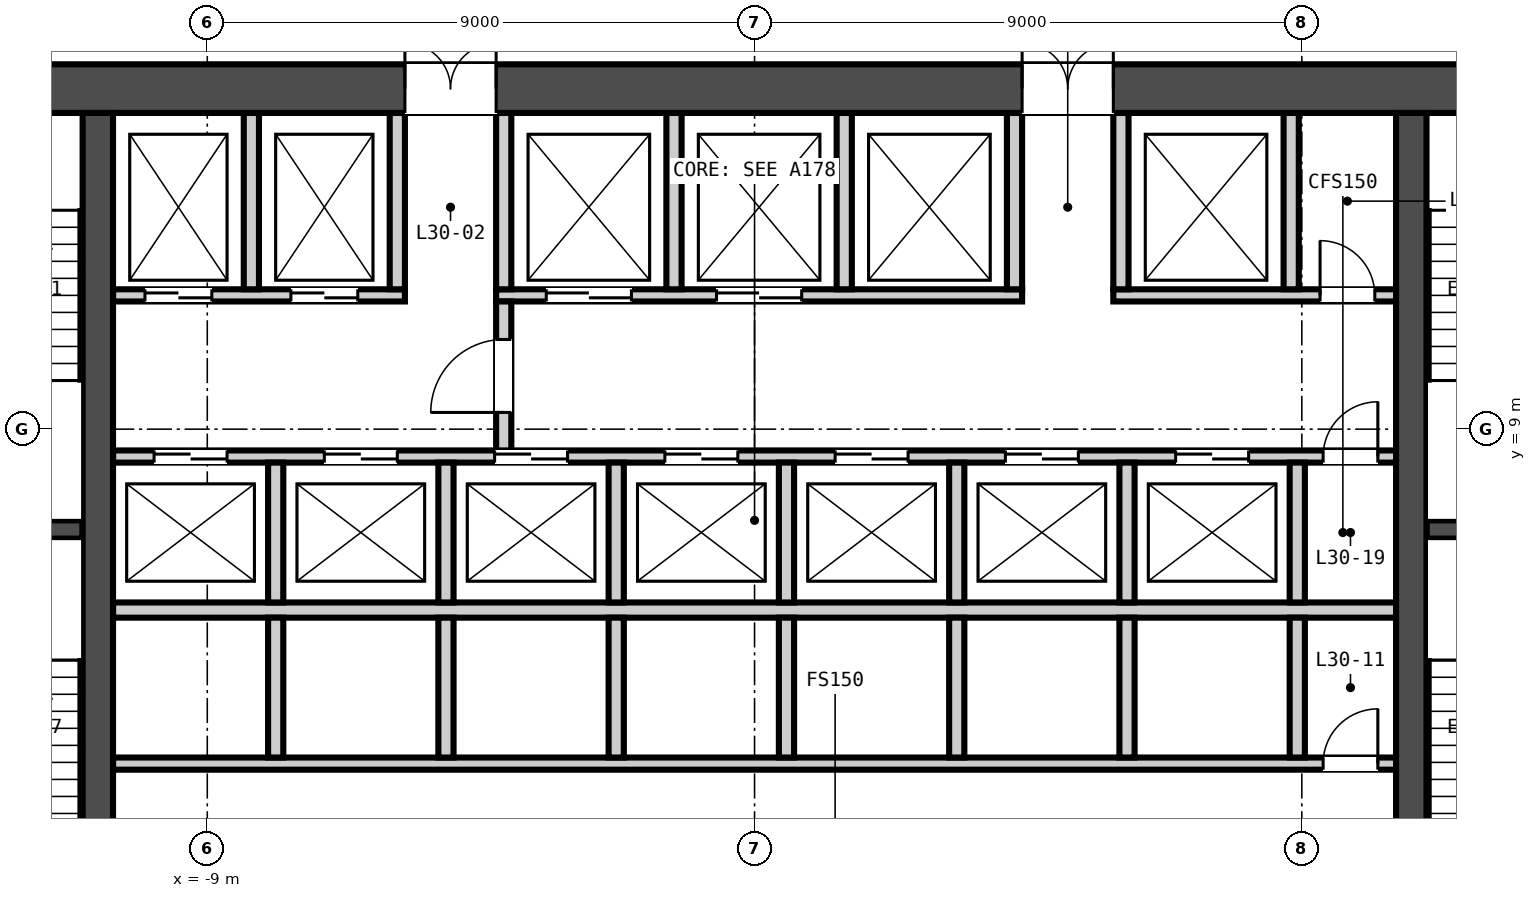
"""IFC4 building model, lengths in metres.
Left out: names, types, materials, properties, quantities, classifications, styles, units other than length and angle.
Written with IfcOpenShell. Run it as: python <this file> out.ifc"""

import sys

from ifc_helpers import new_model, si_unit, direction, frame, frame_2d, origin, place, context, subcontext, project, spatial, rectangle, extrude, element, fill, save


model = new_model("IFC4")
c1 = context("Model", 3, precision=1e-05, world=origin(), true_north=direction((0.0, 1.0)))
c2 = subcontext(c1, "Body", "Model", "MODEL_VIEW")
j1 = project(units=[si_unit("LENGTHUNIT", "METRE"), si_unit("PLANEANGLEUNIT", "RADIAN")], contexts=[c1])
p1 = place(None, origin())
s1 = spatial("IfcSite", under=j1, at=p1, CompositionType="ELEMENT")
p2 = place(p1, origin())
s2 = spatial("IfcBuilding", under=s1, at=p2, CompositionType="ELEMENT")
p3 = place(p2, frame((0.0, 0.0, 126.15)))
s3 = spatial("IfcBuildingStorey", under=s2, at=p3, CompositionType="ELEMENT", Elevation=126.15)
p4 = place(p3, frame((-15.0, 14.6, -0.15), z_axis=(0.0, 0.0, 1.0), x_axis=(1.0, 0.0, 0.0)))
e1 = element("IfcWall", 1, at=p4, inside=s3, PredefinedType="SOLIDWALL", context=c2, shape_type="SweptSolid", body=[
    extrude(rectangle(XDim=30.0, YDim=0.8, at=frame_2d((15.0, 0.0))), origin(), (0.0, 0.0, 1.0), 3.65),
])
p5 = place(p4, frame((9.25, 0.0, 0.15)))
e2 = element("IfcOpeningElement", 2, at=p5, cuts=e1, PredefinedType="OPENING", context=c2, shape_type="SweptSolid", body=[
    extrude(rectangle(XDim=1.5, YDim=2.1, at=frame_2d((0.75, 1.05))), frame((0.0, 0.41, 0.0), z_axis=(0.0, -1.0, 0.0), x_axis=(1.0, 0.0, 0.0)), (0.0, 0.0, 1.0), 0.82),
])
p6 = place(p4, frame((19.4, 0.0, 0.15)))
e3 = element("IfcOpeningElement", 3, at=p6, cuts=e1, PredefinedType="OPENING", context=c2, shape_type="SweptSolid", body=[
    extrude(rectangle(XDim=1.5, YDim=2.1, at=frame_2d((0.75, 1.05))), frame((0.0, 0.41, 0.0), z_axis=(0.0, -1.0, 0.0), x_axis=(1.0, 0.0, 0.0)), (0.0, 0.0, 1.0), 0.82),
])
p7 = place(p4, frame((1.5, 0.0, 0.15)))
e4 = element("IfcOpeningElement", 4, at=p7, cuts=e1, PredefinedType="OPENING", context=c2, shape_type="SweptSolid", body=[
    extrude(rectangle(XDim=1.2, YDim=2.1, at=frame_2d((0.6, 1.05))), frame((0.0, 0.41, 0.0), z_axis=(0.0, -1.0, 0.0), x_axis=(1.0, 0.0, 0.0)), (0.0, 0.0, 1.0), 0.82),
])
p8 = place(p4, frame((27.3, 0.0, 0.15)))
e5 = element("IfcOpeningElement", 5, at=p8, cuts=e1, PredefinedType="OPENING", context=c2, shape_type="SweptSolid", body=[
    extrude(rectangle(XDim=1.2, YDim=2.1, at=frame_2d((0.6, 1.05))), frame((0.0, 0.41, 0.0), z_axis=(0.0, -1.0, 0.0), x_axis=(1.0, 0.0, 0.0)), (0.0, 0.0, 1.0), 0.82),
])
for number, where, z_axis, x_axis in (
    (6, (-10.8, 0.8, -0.15), (0.0, 0.0, 1.0), (0.0, 1.0, 0.0)),
    (7, (10.8, 0.8, -0.15), (0.0, 0.0, 1.0), (0.0, 1.0, 0.0)),
):
    element("IfcWall", number, at=place(p3, frame(where, z_axis=z_axis, x_axis=x_axis)), inside=s3, PredefinedType="SOLIDWALL", context=c2, shape_type="SweptSolid", body=[
        extrude(rectangle(XDim=13.4, YDim=0.5, at=frame_2d((6.7, 0.0))), origin(), (0.0, 0.0, 1.0), 3.65),
    ])
p9 = place(p3, frame((-10.55, 3.5, 0.0), z_axis=(0.0, 0.0, 1.0), x_axis=(1.0, 0.0, 0.0)))
e8 = element("IfcWall", 8, at=p9, inside=s3, PredefinedType="PARTITIONING", context=c2, shape_type="SweptSolid", body=[
    extrude(rectangle(XDim=21.1, YDim=0.2, at=frame_2d((10.55, 0.0))), origin(), (0.0, 0.0, 1.0), 3.5),
])
p10 = place(p9, frame((19.9, 0.0, 0.0)))
e9 = element("IfcOpeningElement", 9, at=p10, cuts=e8, PredefinedType="OPENING", context=c2, shape_type="SweptSolid", body=[
    extrude(rectangle(XDim=0.9, YDim=2.1, at=frame_2d((0.45, 1.05))), frame((0.0, 0.11, 0.0), z_axis=(0.0, -1.0, 0.0), x_axis=(1.0, 0.0, 0.0)), (0.0, 0.0, 1.0), 0.22),
])
p11 = place(p3, frame((-10.55, 6.025, 0.0), z_axis=(0.0, 0.0, 1.0), x_axis=(1.0, 0.0, 0.0)))
e10 = element("IfcWall", 10, at=p11, inside=s3, PredefinedType="PARTITIONING", context=c2, shape_type="SweptSolid", body=[
    extrude(rectangle(XDim=21.1, YDim=0.25, at=frame_2d((10.55, 0.0))), origin(), (0.0, 0.0, 1.0), 3.5),
])
p12 = place(p3, frame((-10.55, 8.55, 0.0), z_axis=(0.0, 0.0, 1.0), x_axis=(1.0, 0.0, 0.0)))
e11 = element("IfcWall", 11, at=p12, inside=s3, PredefinedType="PARTITIONING", context=c2, shape_type="SweptSolid", body=[
    extrude(rectangle(XDim=21.1, YDim=0.2, at=frame_2d((10.55, 0.0))), origin(), (0.0, 0.0, 1.0), 3.5),
])
p13 = place(p12, frame((0.675, 0.0, 0.0)))
e12 = element("IfcOpeningElement", 12, at=p13, cuts=e11, PredefinedType="OPENING", context=c2, shape_type="SweptSolid", body=[
    extrude(rectangle(XDim=1.2, YDim=2.1, at=frame_2d((0.6, 1.05))), frame((0.0, 0.11, 0.0), z_axis=(0.0, -1.0, 0.0), x_axis=(1.0, 0.0, 0.0)), (0.0, 0.0, 1.0), 0.22),
])
p14 = place(p12, frame((3.475, 0.0, 0.0)))
e13 = element("IfcOpeningElement", 13, at=p14, cuts=e11, PredefinedType="OPENING", context=c2, shape_type="SweptSolid", body=[
    extrude(rectangle(XDim=1.2, YDim=2.1, at=frame_2d((0.6, 1.05))), frame((0.0, 0.11, 0.0), z_axis=(0.0, -1.0, 0.0), x_axis=(1.0, 0.0, 0.0)), (0.0, 0.0, 1.0), 0.22),
])
p15 = place(p12, frame((6.275, 0.0, 0.0)))
e14 = element("IfcOpeningElement", 14, at=p15, cuts=e11, PredefinedType="OPENING", context=c2, shape_type="SweptSolid", body=[
    extrude(rectangle(XDim=1.2, YDim=2.1, at=frame_2d((0.6, 1.05))), frame((0.0, 0.11, 0.0), z_axis=(0.0, -1.0, 0.0), x_axis=(1.0, 0.0, 0.0)), (0.0, 0.0, 1.0), 0.22),
])
p16 = place(p12, frame((9.075, 0.0, 0.0)))
e15 = element("IfcOpeningElement", 15, at=p16, cuts=e11, PredefinedType="OPENING", context=c2, shape_type="SweptSolid", body=[
    extrude(rectangle(XDim=1.2, YDim=2.1, at=frame_2d((0.6, 1.05))), frame((0.0, 0.11, 0.0), z_axis=(0.0, -1.0, 0.0), x_axis=(1.0, 0.0, 0.0)), (0.0, 0.0, 1.0), 0.22),
])
p17 = place(p12, frame((11.875, 0.0, 0.0)))
e16 = element("IfcOpeningElement", 16, at=p17, cuts=e11, PredefinedType="OPENING", context=c2, shape_type="SweptSolid", body=[
    extrude(rectangle(XDim=1.2, YDim=2.1, at=frame_2d((0.6, 1.05))), frame((0.0, 0.11, 0.0), z_axis=(0.0, -1.0, 0.0), x_axis=(1.0, 0.0, 0.0)), (0.0, 0.0, 1.0), 0.22),
])
p18 = place(p12, frame((14.675, 0.0, 0.0)))
e17 = element("IfcOpeningElement", 17, at=p18, cuts=e11, PredefinedType="OPENING", context=c2, shape_type="SweptSolid", body=[
    extrude(rectangle(XDim=1.2, YDim=2.1, at=frame_2d((0.6, 1.05))), frame((0.0, 0.11, 0.0), z_axis=(0.0, -1.0, 0.0), x_axis=(1.0, 0.0, 0.0)), (0.0, 0.0, 1.0), 0.22),
])
p19 = place(p12, frame((17.475, 0.0, 0.0)))
e18 = element("IfcOpeningElement", 18, at=p19, cuts=e11, PredefinedType="OPENING", context=c2, shape_type="SweptSolid", body=[
    extrude(rectangle(XDim=1.2, YDim=2.1, at=frame_2d((0.6, 1.05))), frame((0.0, 0.11, 0.0), z_axis=(0.0, -1.0, 0.0), x_axis=(1.0, 0.0, 0.0)), (0.0, 0.0, 1.0), 0.22),
])
p20 = place(p12, frame((19.9, 0.0, 0.0)))
e19 = element("IfcOpeningElement", 19, at=p20, cuts=e11, PredefinedType="OPENING", context=c2, shape_type="SweptSolid", body=[
    extrude(rectangle(XDim=0.9, YDim=2.1, at=frame_2d((0.45, 1.05))), frame((0.0, 0.11, 0.0), z_axis=(0.0, -1.0, 0.0), x_axis=(1.0, 0.0, 0.0)), (0.0, 0.0, 1.0), 0.22),
])
p21 = place(p3, frame((-10.55, 11.2, 0.0), z_axis=(0.0, 0.0, 1.0), x_axis=(1.0, 0.0, 0.0)))
e20 = element("IfcWall", 20, at=p21, inside=s3, PredefinedType="PARTITIONING", context=c2, shape_type="SweptSolid", body=[
    extrude(rectangle(XDim=4.8, YDim=0.2, at=frame_2d((2.4, 0.0))), origin(), (0.0, 0.0, 1.0), 3.5),
])
p22 = place(p21, frame((0.525, 0.0, 0.0)))
e21 = element("IfcOpeningElement", 21, at=p22, cuts=e20, PredefinedType="OPENING", context=c2, shape_type="SweptSolid", body=[
    extrude(rectangle(XDim=1.1, YDim=2.1, at=frame_2d((0.55, 1.05))), frame((0.0, 0.11, 0.0), z_axis=(0.0, -1.0, 0.0), x_axis=(1.0, 0.0, 0.0)), (0.0, 0.0, 1.0), 0.22),
])
p23 = place(p21, frame((2.925, 0.0, 0.0)))
e22 = element("IfcOpeningElement", 22, at=p23, cuts=e20, PredefinedType="OPENING", context=c2, shape_type="SweptSolid", body=[
    extrude(rectangle(XDim=1.1, YDim=2.1, at=frame_2d((0.55, 1.05))), frame((0.0, 0.11, 0.0), z_axis=(0.0, -1.0, 0.0), x_axis=(1.0, 0.0, 0.0)), (0.0, 0.0, 1.0), 0.22),
])
p24 = place(p3, frame((-4.25, 11.2, 0.0), z_axis=(0.0, 0.0, 1.0), x_axis=(1.0, 0.0, 0.0)))
e23 = element("IfcWall", 23, at=p24, inside=s3, PredefinedType="PARTITIONING", context=c2, shape_type="SweptSolid", body=[
    extrude(rectangle(XDim=8.65, YDim=0.2, at=frame_2d((4.325, 0.0))), origin(), (0.0, 0.0, 1.0), 3.5),
])
p25 = place(p24, frame((0.825, 0.0, 0.0)))
e24 = element("IfcOpeningElement", 24, at=p25, cuts=e23, PredefinedType="OPENING", context=c2, shape_type="SweptSolid", body=[
    extrude(rectangle(XDim=1.4, YDim=2.1, at=frame_2d((0.7, 1.05))), frame((0.0, 0.11, 0.0), z_axis=(0.0, -1.0, 0.0), x_axis=(1.0, 0.0, 0.0)), (0.0, 0.0, 1.0), 0.22),
])
p26 = place(p24, frame((3.625, 0.0, 0.0)))
e25 = element("IfcOpeningElement", 25, at=p26, cuts=e23, PredefinedType="OPENING", context=c2, shape_type="SweptSolid", body=[
    extrude(rectangle(XDim=1.4, YDim=2.1, at=frame_2d((0.7, 1.05))), frame((0.0, 0.11, 0.0), z_axis=(0.0, -1.0, 0.0), x_axis=(1.0, 0.0, 0.0)), (0.0, 0.0, 1.0), 0.22),
])
p27 = place(p3, frame((5.9, 11.2, 0.0), z_axis=(0.0, 0.0, 1.0), x_axis=(1.0, 0.0, 0.0)))
e26 = element("IfcWall", 26, at=p27, inside=s3, PredefinedType="PARTITIONING", context=c2, shape_type="SweptSolid", body=[
    extrude(rectangle(XDim=4.65, YDim=0.2, at=frame_2d((2.325, 0.0))), origin(), (0.0, 0.0, 1.0), 3.5),
])
p28 = place(p27, frame((3.4, 0.0, 0.0)))
e27 = element("IfcOpeningElement", 27, at=p28, cuts=e26, PredefinedType="OPENING", context=c2, shape_type="SweptSolid", body=[
    extrude(rectangle(XDim=0.9, YDim=2.1, at=frame_2d((0.45, 1.05))), frame((0.0, 0.11, 0.0), z_axis=(0.0, -1.0, 0.0), x_axis=(1.0, 0.0, 0.0)), (0.0, 0.0, 1.0), 0.22),
])
p29 = place(p3, frame((-4.125, 8.65, 0.0), z_axis=(0.0, 0.0, 1.0), x_axis=(0.0, 1.0, 0.0)))
e28 = element("IfcWall", 28, at=p29, inside=s3, PredefinedType="PARTITIONING", context=c2, shape_type="SweptSolid", body=[
    extrude(rectangle(XDim=2.45, YDim=0.25, at=frame_2d((1.225, 0.0))), origin(), (0.0, 0.0, 1.0), 3.5),
])
p30 = place(p29, frame((0.625, 0.0, 0.0)))
e29 = element("IfcOpeningElement", 29, at=p30, cuts=e28, PredefinedType="OPENING", context=c2, shape_type="SweptSolid", body=[
    extrude(rectangle(XDim=1.2, YDim=2.1, at=frame_2d((0.6, 1.05))), frame((0.0, 0.135, 0.0), z_axis=(0.0, -1.0, 0.0), x_axis=(1.0, 0.0, 0.0)), (0.0, 0.0, 1.0), 0.27),
])
for number, where, z_axis, x_axis in (
    (30, (-7.875, 3.6, 0.0), (0.0, 0.0, 1.0), (0.0, 1.0, 0.0)),
    (31, (-5.075, 3.6, 0.0), (0.0, 0.0, 1.0), (0.0, 1.0, 0.0)),
    (32, (-2.275, 3.6, 0.0), (0.0, 0.0, 1.0), (0.0, 1.0, 0.0)),
    (33, (0.525, 3.6, 0.0), (0.0, 0.0, 1.0), (0.0, 1.0, 0.0)),
    (34, (3.325, 3.6, 0.0), (0.0, 0.0, 1.0), (0.0, 1.0, 0.0)),
    (35, (6.125, 3.6, 0.0), (0.0, 0.0, 1.0), (0.0, 1.0, 0.0)),
    (36, (8.925, 3.6, 0.0), (0.0, 0.0, 1.0), (0.0, 1.0, 0.0)),
):
    element("IfcWall", number, at=place(p3, frame(where, z_axis=z_axis, x_axis=x_axis)), inside=s3, PredefinedType="PARTITIONING", context=c2, shape_type="SweptSolid", body=[
        extrude(rectangle(XDim=2.3, YDim=0.25, at=frame_2d((1.15, 0.0))), origin(), (0.0, 0.0, 1.0), 3.5),
    ])
for number, where, z_axis, x_axis in (
    (37, (-7.875, 6.15, 0.0), (0.0, 0.0, 1.0), (0.0, 1.0, 0.0)),
    (38, (-5.075, 6.15, 0.0), (0.0, 0.0, 1.0), (0.0, 1.0, 0.0)),
    (39, (-2.275, 6.15, 0.0), (0.0, 0.0, 1.0), (0.0, 1.0, 0.0)),
    (40, (0.525, 6.15, 0.0), (0.0, 0.0, 1.0), (0.0, 1.0, 0.0)),
    (41, (3.325, 6.15, 0.0), (0.0, 0.0, 1.0), (0.0, 1.0, 0.0)),
    (42, (6.125, 6.15, 0.0), (0.0, 0.0, 1.0), (0.0, 1.0, 0.0)),
    (43, (8.925, 6.15, 0.0), (0.0, 0.0, 1.0), (0.0, 1.0, 0.0)),
):
    element("IfcWall", number, at=place(p3, frame(where, z_axis=z_axis, x_axis=x_axis)), inside=s3, PredefinedType="PARTITIONING", context=c2, shape_type="SweptSolid", body=[
        extrude(rectangle(XDim=2.3, YDim=0.25, at=frame_2d((1.15, 0.0))), origin(), (0.0, 0.0, 1.0), 3.5),
    ])
for number, where, z_axis, x_axis in (
    (44, (-8.275, 11.3, 0.0), (0.0, 0.0, 1.0), (0.0, 1.0, 0.0)),
    (45, (-5.875, 11.3, 0.0), (0.0, 0.0, 1.0), (0.0, 1.0, 0.0)),
    (46, (-4.125, 11.3, 0.0), (0.0, 0.0, 1.0), (0.0, 1.0, 0.0)),
    (47, (-1.325, 11.3, 0.0), (0.0, 0.0, 1.0), (0.0, 1.0, 0.0)),
    (48, (1.475, 11.3, 0.0), (0.0, 0.0, 1.0), (0.0, 1.0, 0.0)),
    (49, (4.275, 11.3, 0.0), (0.0, 0.0, 1.0), (0.0, 1.0, 0.0)),
    (50, (6.025, 11.3, 0.0), (0.0, 0.0, 1.0), (0.0, 1.0, 0.0)),
    (51, (8.825, 11.3, 0.0), (0.0, 0.0, 1.0), (0.0, 1.0, 0.0)),
):
    element("IfcWall", number, at=place(p3, frame(where, z_axis=z_axis, x_axis=x_axis)), inside=s3, PredefinedType="PARTITIONING", context=c2, shape_type="SweptSolid", body=[
        extrude(rectangle(XDim=2.9, YDim=0.25, at=frame_2d((1.45, 0.0))), origin(), (0.0, 0.0, 1.0), 3.5),
    ])
for number, where, z_axis, x_axis in (
    (52, (-14.0, 7.35, 0.0), (0.0, 0.0, 1.0), (1.0, 0.0, 0.0)),
    (53, (11.05, 7.35, 0.0), (0.0, 0.0, 1.0), (1.0, 0.0, 0.0)),
):
    element("IfcWall", number, at=place(p3, frame(where, z_axis=z_axis, x_axis=x_axis)), inside=s3, PredefinedType="SOLIDWALL", context=c2, shape_type="SweptSolid", body=[
        extrude(rectangle(XDim=2.95, YDim=0.3, at=frame_2d((1.475, 0.0))), origin(), (0.0, 0.0, 1.0), 3.5),
    ])
p31 = place(p30, origin())
e54 = element("IfcDoor", 54, at=p31, inside=s3, OperationType="SINGLE_SWING_LEFT", PredefinedType="DOOR", context=c2, shape_type="SweptSolid", body=[
    extrude(rectangle(XDim=1.2, YDim=2.1, at=frame_2d((0.6, 1.05))), frame((0.0, 0.025, 0.0), z_axis=(0.0, -1.0, 0.0), x_axis=(1.0, 0.0, 0.0)), (0.0, 0.0, 1.0), 0.05),
])
fill(e29, e54)
p32 = place(p10, origin())
e55 = element("IfcDoor", 55, at=p32, inside=s3, OperationType="SINGLE_SWING_RIGHT", PredefinedType="DOOR", context=c2, shape_type="SweptSolid", body=[
    extrude(rectangle(XDim=0.9, YDim=2.1, at=frame_2d((0.45, 1.05))), frame((0.0, 0.025, 0.0), z_axis=(0.0, -1.0, 0.0), x_axis=(1.0, 0.0, 0.0)), (0.0, 0.0, 1.0), 0.05),
])
fill(e9, e55)
p33 = place(p13, origin())
e56 = element("IfcDoor", 56, at=p33, inside=s3, OperationType="DOUBLE_DOOR_SLIDING", PredefinedType="DOOR", context=c2, shape_type="SweptSolid", body=[
    extrude(rectangle(XDim=1.2, YDim=2.1, at=frame_2d((0.6, 1.05))), frame((0.0, 0.025, 0.0), z_axis=(0.0, -1.0, 0.0), x_axis=(1.0, 0.0, 0.0)), (0.0, 0.0, 1.0), 0.05),
])
fill(e12, e56)
p34 = place(p14, origin())
e57 = element("IfcDoor", 57, at=p34, inside=s3, OperationType="DOUBLE_DOOR_SLIDING", PredefinedType="DOOR", context=c2, shape_type="SweptSolid", body=[
    extrude(rectangle(XDim=1.2, YDim=2.1, at=frame_2d((0.6, 1.05))), frame((0.0, 0.025, 0.0), z_axis=(0.0, -1.0, 0.0), x_axis=(1.0, 0.0, 0.0)), (0.0, 0.0, 1.0), 0.05),
])
fill(e13, e57)
p35 = place(p15, origin())
e58 = element("IfcDoor", 58, at=p35, inside=s3, OperationType="DOUBLE_DOOR_SLIDING", PredefinedType="DOOR", context=c2, shape_type="SweptSolid", body=[
    extrude(rectangle(XDim=1.2, YDim=2.1, at=frame_2d((0.6, 1.05))), frame((0.0, 0.025, 0.0), z_axis=(0.0, -1.0, 0.0), x_axis=(1.0, 0.0, 0.0)), (0.0, 0.0, 1.0), 0.05),
])
fill(e14, e58)
p36 = place(p16, origin())
e59 = element("IfcDoor", 59, at=p36, inside=s3, OperationType="DOUBLE_DOOR_SLIDING", PredefinedType="DOOR", context=c2, shape_type="SweptSolid", body=[
    extrude(rectangle(XDim=1.2, YDim=2.1, at=frame_2d((0.6, 1.05))), frame((0.0, 0.025, 0.0), z_axis=(0.0, -1.0, 0.0), x_axis=(1.0, 0.0, 0.0)), (0.0, 0.0, 1.0), 0.05),
])
fill(e15, e59)
p37 = place(p17, origin())
e60 = element("IfcDoor", 60, at=p37, inside=s3, OperationType="DOUBLE_DOOR_SLIDING", PredefinedType="DOOR", context=c2, shape_type="SweptSolid", body=[
    extrude(rectangle(XDim=1.2, YDim=2.1, at=frame_2d((0.6, 1.05))), frame((0.0, 0.025, 0.0), z_axis=(0.0, -1.0, 0.0), x_axis=(1.0, 0.0, 0.0)), (0.0, 0.0, 1.0), 0.05),
])
fill(e16, e60)
p38 = place(p18, origin())
e61 = element("IfcDoor", 61, at=p38, inside=s3, OperationType="DOUBLE_DOOR_SLIDING", PredefinedType="DOOR", context=c2, shape_type="SweptSolid", body=[
    extrude(rectangle(XDim=1.2, YDim=2.1, at=frame_2d((0.6, 1.05))), frame((0.0, 0.025, 0.0), z_axis=(0.0, -1.0, 0.0), x_axis=(1.0, 0.0, 0.0)), (0.0, 0.0, 1.0), 0.05),
])
fill(e17, e61)
p39 = place(p19, origin())
e62 = element("IfcDoor", 62, at=p39, inside=s3, OperationType="DOUBLE_DOOR_SLIDING", PredefinedType="DOOR", context=c2, shape_type="SweptSolid", body=[
    extrude(rectangle(XDim=1.2, YDim=2.1, at=frame_2d((0.6, 1.05))), frame((0.0, 0.025, 0.0), z_axis=(0.0, -1.0, 0.0), x_axis=(1.0, 0.0, 0.0)), (0.0, 0.0, 1.0), 0.05),
])
fill(e18, e62)
p40 = place(p20, origin())
e63 = element("IfcDoor", 63, at=p40, inside=s3, OperationType="SINGLE_SWING_RIGHT", PredefinedType="DOOR", context=c2, shape_type="SweptSolid", body=[
    extrude(rectangle(XDim=0.9, YDim=2.1, at=frame_2d((0.45, 1.05))), frame((0.0, 0.025, 0.0), z_axis=(0.0, -1.0, 0.0), x_axis=(1.0, 0.0, 0.0)), (0.0, 0.0, 1.0), 0.05),
])
fill(e19, e63)
p41 = place(p22, origin())
e64 = element("IfcDoor", 64, at=p41, inside=s3, OperationType="DOUBLE_DOOR_SLIDING", PredefinedType="DOOR", context=c2, shape_type="SweptSolid", body=[
    extrude(rectangle(XDim=1.1, YDim=2.1, at=frame_2d((0.55, 1.05))), frame((0.0, 0.025, 0.0), z_axis=(0.0, -1.0, 0.0), x_axis=(1.0, 0.0, 0.0)), (0.0, 0.0, 1.0), 0.05),
])
fill(e21, e64)
p42 = place(p23, origin())
e65 = element("IfcDoor", 65, at=p42, inside=s3, OperationType="DOUBLE_DOOR_SLIDING", PredefinedType="DOOR", context=c2, shape_type="SweptSolid", body=[
    extrude(rectangle(XDim=1.1, YDim=2.1, at=frame_2d((0.55, 1.05))), frame((0.0, 0.025, 0.0), z_axis=(0.0, -1.0, 0.0), x_axis=(1.0, 0.0, 0.0)), (0.0, 0.0, 1.0), 0.05),
])
fill(e22, e65)
p43 = place(p25, origin())
e66 = element("IfcDoor", 66, at=p43, inside=s3, OperationType="DOUBLE_DOOR_SLIDING", PredefinedType="DOOR", context=c2, shape_type="SweptSolid", body=[
    extrude(rectangle(XDim=1.4, YDim=2.1, at=frame_2d((0.7, 1.05))), frame((0.0, 0.025, 0.0), z_axis=(0.0, -1.0, 0.0), x_axis=(1.0, 0.0, 0.0)), (0.0, 0.0, 1.0), 0.05),
])
fill(e24, e66)
p44 = place(p26, origin())
e67 = element("IfcDoor", 67, at=p44, inside=s3, OperationType="DOUBLE_DOOR_SLIDING", PredefinedType="DOOR", context=c2, shape_type="SweptSolid", body=[
    extrude(rectangle(XDim=1.4, YDim=2.1, at=frame_2d((0.7, 1.05))), frame((0.0, 0.025, 0.0), z_axis=(0.0, -1.0, 0.0), x_axis=(1.0, 0.0, 0.0)), (0.0, 0.0, 1.0), 0.05),
])
fill(e25, e67)
p45 = place(p28, origin())
e68 = element("IfcDoor", 68, at=p45, inside=s3, OperationType="SINGLE_SWING_LEFT", PredefinedType="DOOR", context=c2, shape_type="SweptSolid", body=[
    extrude(rectangle(XDim=0.9, YDim=2.1, at=frame_2d((0.45, 1.05))), frame((0.0, 0.025, 0.0), z_axis=(0.0, -1.0, 0.0), x_axis=(1.0, 0.0, 0.0)), (0.0, 0.0, 1.0), 0.05),
])
fill(e27, e68)
p46 = place(p5, origin())
e69 = element("IfcDoor", 69, at=p46, inside=s3, OperationType="DOUBLE_DOOR_SINGLE_SWING", PredefinedType="DOOR", context=c2, shape_type="SweptSolid", body=[
    extrude(rectangle(XDim=1.5, YDim=2.1, at=frame_2d((0.75, 1.05))), frame((0.0, 0.025, 0.0), z_axis=(0.0, -1.0, 0.0), x_axis=(1.0, 0.0, 0.0)), (0.0, 0.0, 1.0), 0.05),
])
fill(e2, e69)
p47 = place(p6, origin())
e70 = element("IfcDoor", 70, at=p47, inside=s3, OperationType="DOUBLE_DOOR_SINGLE_SWING", PredefinedType="DOOR", context=c2, shape_type="SweptSolid", body=[
    extrude(rectangle(XDim=1.5, YDim=2.1, at=frame_2d((0.75, 1.05))), frame((0.0, 0.025, 0.0), z_axis=(0.0, -1.0, 0.0), x_axis=(1.0, 0.0, 0.0)), (0.0, 0.0, 1.0), 0.05),
])
fill(e3, e70)
save(model, sys.argv[1])
